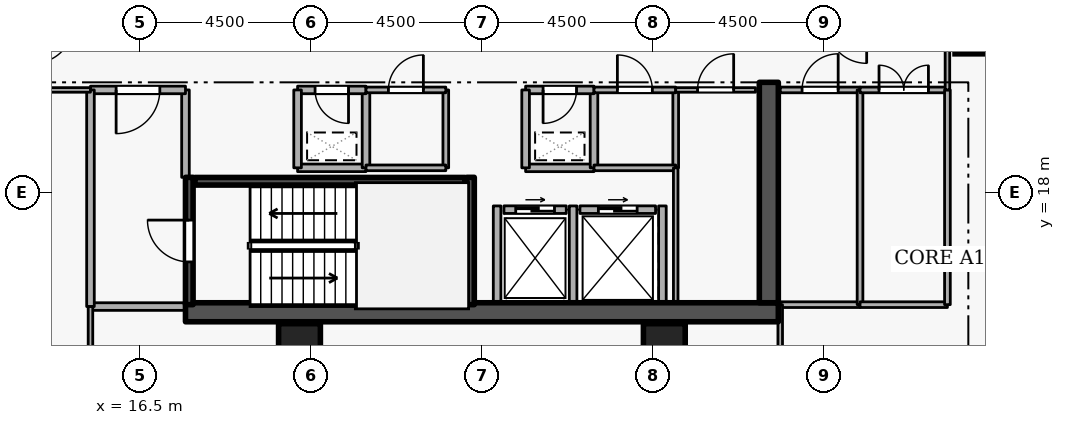
"""IFC4 building model, lengths in metres.
Left out: names, types, materials, properties, quantities, classifications, styles, units other than length and angle.
Written with IfcOpenShell. Run it as: python <this file> out.ifc"""

import sys

from ifc_helpers import new_model, si_unit, direction, frame, frame_2d, origin, origin_2d, place, context, subcontext, project, spatial, rectangle, extrude, element, fill, save


model = new_model("IFC4")
c1 = context("Model", 3, precision=1e-05, world=origin(), true_north=direction((0.0, 1.0)))
c2 = subcontext(c1, "Body", "Model", "MODEL_VIEW")
j1 = project(units=[si_unit("LENGTHUNIT", "METRE"), si_unit("PLANEANGLEUNIT", "RADIAN")], contexts=[c1])
p1 = place(None, origin())
s1 = spatial("IfcSite", under=j1, at=p1, CompositionType="ELEMENT")
p2 = place(p1, origin())
s2 = spatial("IfcBuilding", under=s1, at=p2, CompositionType="ELEMENT")
p3 = place(p2, frame((0.0, 0.0, 185.7)))
s3 = spatial("IfcBuildingStorey", under=s2, at=p3, CompositionType="ELEMENT", Elevation=185.7)
p4 = place(p3, frame((17.7, 14.85, 0.0), z_axis=(0.0, 0.0, 1.0), x_axis=(1.0, 0.0, 0.0)))
e1 = element("IfcWall", 1, at=p4, inside=s3, PredefinedType="SHEAR", context=c2, shape_type="SweptSolid", body=[
    extrude(rectangle(XDim=15.6, YDim=0.5, at=frame_2d((7.8, 0.0))), origin(), (0.0, 0.0, 1.0), 3.6),
])
p5 = place(p3, frame((33.05, 15.1, 0.0), z_axis=(0.0, 0.0, 1.0), x_axis=(0.0, 1.0, 0.0)))
e2 = element("IfcWall", 2, at=p5, inside=s3, PredefinedType="SHEAR", context=c2, shape_type="SweptSolid", body=[
    extrude(rectangle(XDim=5.8, YDim=0.5, at=frame_2d((2.9, 0.0))), origin(), (0.0, 0.0, 1.0), 3.6),
])
for number, where, z_axis, x_axis in (
    (3, (38.5, 22.2, 0.0), (0.0, 0.0, 1.0), (1.0, 0.0, 0.0)),
    (4, (20.7, 14.0, 0.0), (0.0, 0.0, 1.0), (1.0, 0.0, 0.0)),
    (5, (30.3, 14.0, 0.0), (0.0, 0.0, 1.0), (1.0, 0.0, 0.0)),
):
    element("IfcColumn", number, at=place(p3, frame(where, z_axis=z_axis, x_axis=x_axis)), inside=s3, PredefinedType="COLUMN", context=c2, shape_type="SweptSolid", body=[
        extrude(rectangle(XDim=1.1, YDim=1.1, at=origin_2d()), origin(), (0.0, 0.0, 1.0), 3.6),
    ])
p6 = place(p3, frame((26.08, 17.55, 0.0), z_axis=(0.0, 0.0, 1.0), x_axis=(1.0, 0.0, 0.0)))
e6 = element("IfcWall", 6, at=p6, inside=s3, PredefinedType="STANDARD", context=c2, shape_type="SweptSolid", body=[
    extrude(rectangle(XDim=1.64, YDim=0.2, at=frame_2d((0.82, 0.0))), origin(), (0.0, 0.0, 1.0), 3.34),
])
p7 = place(p6, frame((0.31, 0.0, 0.0)))
e7 = element("IfcOpeningElement", 7, at=p7, cuts=e6, PredefinedType="OPENING", context=c2, shape_type="SweptSolid", body=[
    extrude(rectangle(XDim=1.02, YDim=2.06, at=frame_2d((0.51, 1.03))), frame((0.0, 0.11, 0.0), z_axis=(0.0, -1.0, 0.0), x_axis=(1.0, 0.0, 0.0)), (0.0, 0.0, 1.0), 0.22),
])
p8 = place(p3, frame((28.08, 17.55, 0.0), z_axis=(0.0, 0.0, 1.0), x_axis=(1.0, 0.0, 0.0)))
e8 = element("IfcWall", 8, at=p8, inside=s3, PredefinedType="STANDARD", context=c2, shape_type="SweptSolid", body=[
    extrude(rectangle(XDim=1.99, YDim=0.2, at=frame_2d((0.995, 0.0))), origin(), (0.0, 0.0, 1.0), 3.34),
])
p9 = place(p8, frame((0.485, 0.0, 0.0)))
e9 = element("IfcOpeningElement", 9, at=p9, cuts=e8, PredefinedType="OPENING", context=c2, shape_type="SweptSolid", body=[
    extrude(rectangle(XDim=1.02, YDim=2.06, at=frame_2d((0.51, 1.03))), frame((0.0, 0.11, 0.0), z_axis=(0.0, -1.0, 0.0), x_axis=(1.0, 0.0, 0.0)), (0.0, 0.0, 1.0), 0.22),
])
for number, where, z_axis, x_axis in (
    (10, (27.9, 15.112, 0.0), (0.0, 0.0, 1.0), (0.0, 1.0, 0.0)),
    (11, (25.9, 15.112, 0.0), (0.0, 0.0, 1.0), (0.0, 1.0, 0.0)),
    (12, (30.25, 15.112, 0.0), (0.0, 0.0, 1.0), (0.0, 1.0, 0.0)),
):
    element("IfcWall", number, at=place(p3, frame(where, z_axis=z_axis, x_axis=x_axis)), inside=s3, PredefinedType="STANDARD", context=c2, shape_type="SweptSolid", body=[
        extrude(rectangle(XDim=2.536, YDim=0.2, at=frame_2d((1.268, 0.0))), origin(), (0.0, 0.0, 1.0), 3.34),
    ])
p10 = place(p3, frame((17.8, 15.05, 0.0), z_axis=(0.0, 0.0, 1.0), x_axis=(0.0, 1.0, 0.0)))
e13 = element("IfcWall", 13, at=p10, inside=s3, PredefinedType="SHEAR", context=c2, shape_type="SweptSolid", body=[
    extrude(rectangle(XDim=3.35, YDim=0.2, at=frame_2d((1.675, 0.0))), origin(), (0.0, 0.0, 1.0), 3.6),
])
p11 = place(p10, frame((1.125, 0.0, 0.0)))
e14 = element("IfcOpeningElement", 14, at=p11, cuts=e13, PredefinedType="OPENING", context=c2, shape_type="SweptSolid", body=[
    extrude(rectangle(XDim=1.1, YDim=2.1, at=frame_2d((0.55, 1.05))), frame((0.0, 0.11, 0.0), z_axis=(0.0, -1.0, 0.0), x_axis=(1.0, 0.0, 0.0)), (0.0, 0.0, 1.0), 0.22),
])
p12 = place(p3, frame((25.2, 18.4, 0.0), z_axis=(0.0, 0.0, 1.0), x_axis=(0.0, -1.0, 0.0)))
e15 = element("IfcWall", 15, at=p12, inside=s3, PredefinedType="SHEAR", context=c2, shape_type="SweptSolid", body=[
    extrude(rectangle(XDim=3.35, YDim=0.2, at=frame_2d((1.675, 0.0))), origin(), (0.0, 0.0, 1.0), 3.6),
])
p13 = place(p3, frame((25.05, 18.297, 0.0), z_axis=(0.0, 0.0, 1.0), x_axis=(-1.0, 0.0, 0.0)))
e16 = element("IfcWall", 16, at=p13, inside=s3, PredefinedType="SHEAR", context=c2, shape_type="SweptSolid", body=[
    extrude(rectangle(XDim=7.1, YDim=0.2, at=frame_2d((3.55, 0.0))), origin(), (0.0, 0.0, 1.0), 3.6),
])
p14 = place(p3, frame((15.2, 15.0, 0.0), z_axis=(0.0, 0.0, 1.0), x_axis=(1.0, 0.0, 0.0)))
e17 = element("IfcWall", 17, at=p14, inside=s3, PredefinedType="STANDARD", context=c2, shape_type="SweptSolid", body=[
    extrude(rectangle(XDim=2.5, YDim=0.2, at=frame_2d((1.25, 0.0))), origin(), (0.0, 0.0, 1.0), 3.34),
])
p15 = place(p3, frame((17.7, 18.4, 0.0), z_axis=(0.0, 0.0, 1.0), x_axis=(0.0, 1.0, 0.0)))
e18 = element("IfcWall", 18, at=p15, inside=s3, PredefinedType="STANDARD", context=c2, shape_type="SweptSolid", body=[
    extrude(rectangle(XDim=2.3, YDim=0.2, at=frame_2d((1.15, 0.0))), origin(), (0.0, 0.0, 1.0), 2.545),
])
p16 = place(p3, frame((17.7, 20.7, 0.0), z_axis=(0.0, 0.0, 1.0), x_axis=(-1.0, 0.0, 0.0)))
e19 = element("IfcWall", 19, at=p16, inside=s3, PredefinedType="STANDARD", context=c2, shape_type="SweptSolid", body=[
    extrude(rectangle(XDim=2.5, YDim=0.2, at=frame_2d((1.25, 0.0))), origin(), (0.0, 0.0, 1.0), 3.34),
])
p17 = place(p16, frame((0.675, 0.0, 0.0)))
e20 = element("IfcOpeningElement", 20, at=p17, cuts=e19, PredefinedType="OPENING", context=c2, shape_type="SweptSolid", body=[
    extrude(rectangle(XDim=1.15, YDim=2.1, at=frame_2d((0.575, 1.05))), frame((0.0, 0.11, 0.0), z_axis=(0.0, -1.0, 0.0), x_axis=(1.0, 0.0, 0.0)), (0.0, 0.0, 1.0), 0.22),
])
p18 = place(p3, frame((15.2, 20.7, 0.0), z_axis=(0.0, 0.0, 1.0), x_axis=(0.0, -1.0, 0.0)))
e21 = element("IfcWall", 21, at=p18, inside=s3, PredefinedType="STANDARD", context=c2, shape_type="SweptSolid", body=[
    extrude(rectangle(XDim=5.7, YDim=0.2, at=frame_2d((2.85, 0.0))), origin(), (0.0, 0.0, 1.0), 3.34),
])
p19 = place(p3, frame((26.65, 18.65, 0.0), z_axis=(0.0, 0.0, 1.0), x_axis=(1.0, 0.0, 0.0)))
e22 = element("IfcWall", 22, at=p19, inside=s3, PredefinedType="STANDARD", context=c2, shape_type="SweptSolid", body=[
    extrude(rectangle(XDim=1.8, YDim=0.2, at=frame_2d((0.9, 0.0))), origin(), (0.0, 0.0, 1.0), 3.34),
])
p20 = place(p3, frame((28.45, 18.65, 0.0), z_axis=(0.0, 0.0, 1.0), x_axis=(0.0, 1.0, 0.0)))
e23 = element("IfcWall", 23, at=p20, inside=s3, PredefinedType="STANDARD", context=c2, shape_type="SweptSolid", body=[
    extrude(rectangle(XDim=2.05, YDim=0.2, at=frame_2d((1.025, 0.0))), origin(), (0.0, 0.0, 1.0), 3.34),
])
p21 = place(p3, frame((28.45, 20.7, 0.0), z_axis=(0.0, 0.0, 1.0), x_axis=(-1.0, 0.0, 0.0)))
e24 = element("IfcWall", 24, at=p21, inside=s3, PredefinedType="STANDARD", context=c2, shape_type="SweptSolid", body=[
    extrude(rectangle(XDim=1.8, YDim=0.2, at=frame_2d((0.9, 0.0))), origin(), (0.0, 0.0, 1.0), 3.34),
])
p22 = place(p21, frame((0.46, 0.0, 0.0)))
e25 = element("IfcOpeningElement", 25, at=p22, cuts=e24, PredefinedType="OPENING", context=c2, shape_type="SweptSolid", body=[
    extrude(rectangle(XDim=0.88, YDim=2.04, at=frame_2d((0.44, 1.02))), frame((0.0, 0.11, 0.0), z_axis=(0.0, -1.0, 0.0), x_axis=(1.0, 0.0, 0.0)), (0.0, 0.0, 1.0), 0.22),
])
p23 = place(p3, frame((26.65, 20.7, 0.0), z_axis=(0.0, 0.0, 1.0), x_axis=(0.0, -1.0, 0.0)))
e26 = element("IfcWall", 26, at=p23, inside=s3, PredefinedType="STANDARD", context=c2, shape_type="SweptSolid", body=[
    extrude(rectangle(XDim=2.05, YDim=0.2, at=frame_2d((1.025, 0.0))), origin(), (0.0, 0.0, 1.0), 3.34),
])
p24 = place(p3, frame((20.65, 18.65, 0.0), z_axis=(0.0, 0.0, 1.0), x_axis=(1.0, 0.0, 0.0)))
e27 = element("IfcWall", 27, at=p24, inside=s3, PredefinedType="STANDARD", context=c2, shape_type="SweptSolid", body=[
    extrude(rectangle(XDim=1.8, YDim=0.2, at=frame_2d((0.9, 0.0))), origin(), (0.0, 0.0, 1.0), 3.34),
])
p25 = place(p3, frame((22.45, 18.65, 0.0), z_axis=(0.0, 0.0, 1.0), x_axis=(0.0, 1.0, 0.0)))
e28 = element("IfcWall", 28, at=p25, inside=s3, PredefinedType="STANDARD", context=c2, shape_type="SweptSolid", body=[
    extrude(rectangle(XDim=2.05, YDim=0.2, at=frame_2d((1.025, 0.0))), origin(), (0.0, 0.0, 1.0), 3.34),
])
p26 = place(p3, frame((22.45, 20.7, 0.0), z_axis=(0.0, 0.0, 1.0), x_axis=(-1.0, 0.0, 0.0)))
e29 = element("IfcWall", 29, at=p26, inside=s3, PredefinedType="STANDARD", context=c2, shape_type="SweptSolid", body=[
    extrude(rectangle(XDim=1.8, YDim=0.2, at=frame_2d((0.9, 0.0))), origin(), (0.0, 0.0, 1.0), 3.34),
])
p27 = place(p26, frame((0.46, 0.0, 0.0)))
e30 = element("IfcOpeningElement", 30, at=p27, cuts=e29, PredefinedType="OPENING", context=c2, shape_type="SweptSolid", body=[
    extrude(rectangle(XDim=0.88, YDim=2.04, at=frame_2d((0.44, 1.02))), frame((0.0, 0.11, 0.0), z_axis=(0.0, -1.0, 0.0), x_axis=(1.0, 0.0, 0.0)), (0.0, 0.0, 1.0), 0.22),
])
p28 = place(p3, frame((20.65, 20.7, 0.0), z_axis=(0.0, 0.0, 1.0), x_axis=(0.0, -1.0, 0.0)))
e31 = element("IfcWall", 31, at=p28, inside=s3, PredefinedType="STANDARD", context=c2, shape_type="SweptSolid", body=[
    extrude(rectangle(XDim=2.05, YDim=0.2, at=frame_2d((1.025, 0.0))), origin(), (0.0, 0.0, 1.0), 3.34),
])
p29 = place(p3, frame((24.55, 20.7, 0.0), z_axis=(0.0, 0.0, 1.0), x_axis=(0.0, -1.0, 0.0)))
e32 = element("IfcWall", 32, at=p29, inside=s3, PredefinedType="PARTITIONING", context=c2, shape_type="SweptSolid", body=[
    extrude(rectangle(XDim=2.05, YDim=0.15, at=frame_2d((1.025, 0.0))), origin(), (0.0, 0.0, 1.0), 3.34),
])
p30 = place(p3, frame((24.55, 18.65, 0.0), z_axis=(0.0, 0.0, 1.0), x_axis=(-1.0, 0.0, 0.0)))
e33 = element("IfcWall", 33, at=p30, inside=s3, PredefinedType="PARTITIONING", context=c2, shape_type="SweptSolid", body=[
    extrude(rectangle(XDim=2.1, YDim=0.15, at=frame_2d((1.05, 0.0))), origin(), (0.0, 0.0, 1.0), 3.34),
])
p31 = place(p3, frame((22.45, 20.7, 0.0), z_axis=(0.0, 0.0, 1.0), x_axis=(1.0, 0.0, 0.0)))
e34 = element("IfcWall", 34, at=p31, inside=s3, PredefinedType="PARTITIONING", context=c2, shape_type="SweptSolid", body=[
    extrude(rectangle(XDim=2.1, YDim=0.15, at=frame_2d((1.05, 0.0))), origin(), (0.0, 0.0, 1.0), 3.34),
])
p32 = place(p31, frame((0.59, 0.0, 0.0)))
e35 = element("IfcOpeningElement", 35, at=p32, cuts=e34, PredefinedType="OPENING", context=c2, shape_type="SweptSolid", body=[
    extrude(rectangle(XDim=0.92, YDim=2.08, at=frame_2d((0.46, 1.04))), frame((0.0, 0.085, 0.0), z_axis=(0.0, -1.0, 0.0), x_axis=(1.0, 0.0, 0.0)), (0.0, 0.0, 1.0), 0.17),
])
p33 = place(p3, frame((30.6, 20.7, 0.0), z_axis=(0.0, 0.0, 1.0), x_axis=(0.0, -1.0, 0.0)))
e36 = element("IfcWall", 36, at=p33, inside=s3, PredefinedType="PARTITIONING", context=c2, shape_type="SweptSolid", body=[
    extrude(rectangle(XDim=2.05, YDim=0.15, at=frame_2d((1.025, 0.0))), origin(), (0.0, 0.0, 1.0), 3.34),
])
p34 = place(p3, frame((30.6, 18.65, 0.0), z_axis=(0.0, 0.0, 1.0), x_axis=(-1.0, 0.0, 0.0)))
e37 = element("IfcWall", 37, at=p34, inside=s3, PredefinedType="PARTITIONING", context=c2, shape_type="SweptSolid", body=[
    extrude(rectangle(XDim=2.15, YDim=0.15, at=frame_2d((1.075, 0.0))), origin(), (0.0, 0.0, 1.0), 3.34),
])
p35 = place(p3, frame((28.45, 20.7, 0.0), z_axis=(0.0, 0.0, 1.0), x_axis=(1.0, 0.0, 0.0)))
e38 = element("IfcWall", 38, at=p35, inside=s3, PredefinedType="PARTITIONING", context=c2, shape_type="SweptSolid", body=[
    extrude(rectangle(XDim=2.15, YDim=0.15, at=frame_2d((1.075, 0.0))), origin(), (0.0, 0.0, 1.0), 3.34),
])
p36 = place(p35, frame((0.615, 0.0, 0.0)))
e39 = element("IfcOpeningElement", 39, at=p36, cuts=e38, PredefinedType="OPENING", context=c2, shape_type="SweptSolid", body=[
    extrude(rectangle(XDim=0.92, YDim=2.08, at=frame_2d((0.46, 1.04))), frame((0.0, 0.085, 0.0), z_axis=(0.0, -1.0, 0.0), x_axis=(1.0, 0.0, 0.0)), (0.0, 0.0, 1.0), 0.17),
])
p37 = place(p3, frame((30.6, 15.1, 0.0), z_axis=(0.0, 0.0, 1.0), x_axis=(0.0, 1.0, 0.0)))
e40 = element("IfcWall", 40, at=p37, inside=s3, PredefinedType="PARTITIONING", context=c2, shape_type="SweptSolid", body=[
    extrude(rectangle(XDim=3.55, YDim=0.12, at=frame_2d((1.775, 0.0))), origin(), (0.0, 0.0, 1.0), 3.34),
])
p38 = place(p3, frame((30.6, 20.7, 0.0), z_axis=(0.0, 0.0, 1.0), x_axis=(1.0, 0.0, 0.0)))
e41 = element("IfcWall", 41, at=p38, inside=s3, PredefinedType="PARTITIONING", context=c2, shape_type="SweptSolid", body=[
    extrude(rectangle(XDim=2.1, YDim=0.12, at=frame_2d((1.05, 0.0))), origin(), (0.0, 0.0, 1.0), 3.34),
])
p39 = place(p38, frame((0.575, 0.0, 0.0)))
e42 = element("IfcOpeningElement", 42, at=p39, cuts=e41, PredefinedType="OPENING", context=c2, shape_type="SweptSolid", body=[
    extrude(rectangle(XDim=0.95, YDim=2.1, at=frame_2d((0.475, 1.05))), frame((0.0, 0.07, 0.0), z_axis=(0.0, -1.0, 0.0), x_axis=(1.0, 0.0, 0.0)), (0.0, 0.0, 1.0), 0.14),
])
p40 = place(p3, frame((35.45, 15.05, 0.0), z_axis=(0.0, 0.0, 1.0), x_axis=(-1.0, 0.0, 0.0)))
e43 = element("IfcWall", 43, at=p40, inside=s3, PredefinedType="PARTITIONING", context=c2, shape_type="SweptSolid", body=[
    extrude(rectangle(XDim=2.1, YDim=0.15, at=frame_2d((1.05, 0.0))), origin(), (0.0, 0.0, 1.0), 3.34),
])
p41 = place(p3, frame((33.35, 20.7, 0.0), z_axis=(0.0, 0.0, 1.0), x_axis=(1.0, 0.0, 0.0)))
e44 = element("IfcWall", 44, at=p41, inside=s3, PredefinedType="PARTITIONING", context=c2, shape_type="SweptSolid", body=[
    extrude(rectangle(XDim=2.1, YDim=0.15, at=frame_2d((1.05, 0.0))), origin(), (0.0, 0.0, 1.0), 3.34),
])
p42 = place(p41, frame((0.575, 0.0, 0.0)))
e45 = element("IfcOpeningElement", 45, at=p42, cuts=e44, PredefinedType="OPENING", context=c2, shape_type="SweptSolid", body=[
    extrude(rectangle(XDim=0.95, YDim=2.1, at=frame_2d((0.475, 1.05))), frame((0.0, 0.085, 0.0), z_axis=(0.0, -1.0, 0.0), x_axis=(1.0, 0.0, 0.0)), (0.0, 0.0, 1.0), 0.17),
])
p43 = place(p3, frame((35.45, 20.7, 0.0), z_axis=(0.0, 0.0, 1.0), x_axis=(0.0, -1.0, 0.0)))
e46 = element("IfcWall", 46, at=p43, inside=s3, PredefinedType="PARTITIONING", context=c2, shape_type="SweptSolid", body=[
    extrude(rectangle(XDim=5.65, YDim=0.15, at=frame_2d((2.825, 0.0))), origin(), (0.0, 0.0, 1.0), 3.34),
])
p44 = place(p3, frame((37.75, 15.05, 0.0), z_axis=(0.0, 0.0, 1.0), x_axis=(-1.0, 0.0, 0.0)))
e47 = element("IfcWall", 47, at=p44, inside=s3, PredefinedType="PARTITIONING", context=c2, shape_type="SweptSolid", body=[
    extrude(rectangle(XDim=2.3, YDim=0.15, at=frame_2d((1.15, 0.0))), origin(), (0.0, 0.0, 1.0), 3.34),
])
p45 = place(p3, frame((35.45, 20.7, 0.0), z_axis=(0.0, 0.0, 1.0), x_axis=(1.0, 0.0, 0.0)))
e48 = element("IfcWall", 48, at=p45, inside=s3, PredefinedType="PARTITIONING", context=c2, shape_type="SweptSolid", body=[
    extrude(rectangle(XDim=2.3, YDim=0.15, at=frame_2d((1.15, 0.0))), origin(), (0.0, 0.0, 1.0), 3.34),
])
p46 = place(p45, frame((0.5, 0.0, 0.0)))
e49 = element("IfcOpeningElement", 49, at=p46, cuts=e48, PredefinedType="OPENING", context=c2, shape_type="SweptSolid", body=[
    extrude(rectangle(XDim=1.3, YDim=2.12, at=frame_2d((0.65, 1.06))), frame((0.0, 0.085, 0.0), z_axis=(0.0, -1.0, 0.0), x_axis=(1.0, 0.0, 0.0)), (0.0, 0.0, 1.0), 0.17),
])
p47 = place(p3, frame((37.75, 20.7, 0.0), z_axis=(0.0, 0.0, 1.0), x_axis=(0.0, -1.0, 0.0)))
e50 = element("IfcWall", 50, at=p47, inside=s3, PredefinedType="PARTITIONING", context=c2, shape_type="SweptSolid", body=[
    extrude(rectangle(XDim=5.65, YDim=0.15, at=frame_2d((2.825, 0.0))), origin(), (0.0, 0.0, 1.0), 3.34),
])
p48 = place(p3, frame((13.25, 20.7, 0.0), z_axis=(0.0, 0.0, 1.0), x_axis=(1.0, 0.0, 0.0)))
e51 = element("IfcWall", 51, at=p48, inside=s3, PredefinedType="PARTITIONING", context=c2, shape_type="SweptSolid", body=[
    extrude(rectangle(XDim=1.95, YDim=0.12, at=frame_2d((0.975, 0.0))), origin(), (0.0, 0.0, 1.0), 3.34),
])
p49 = place(p3, frame((15.2, 15.0, 0.0), z_axis=(0.0, 0.0, 1.0), x_axis=(0.0, -1.0, 0.0)))
e52 = element("IfcWall", 52, at=p49, inside=s3, PredefinedType="PARTITIONING", context=c2, shape_type="SweptSolid", body=[
    extrude(rectangle(XDim=5.72, YDim=0.12, at=frame_2d((2.86, 0.0))), origin(), (0.0, 0.0, 1.0), 3.34),
])
p50 = place(p3, frame((37.75, 20.7, 0.0), z_axis=(0.0, 0.0, 1.0), x_axis=(0.0, 1.0, 0.0)))
e53 = element("IfcWall", 53, at=p50, inside=s3, PredefinedType="PARTITIONING", context=c2, shape_type="SweptSolid", body=[
    extrude(rectangle(XDim=1.75, YDim=0.12, at=frame_2d((0.875, 0.0))), origin(), (0.0, 0.0, 1.0), 3.34),
])
p51 = place(p3, frame((33.35, 9.28, 0.0), z_axis=(0.0, 0.0, 1.0), x_axis=(0.0, 1.0, 0.0)))
e54 = element("IfcWall", 54, at=p51, inside=s3, PredefinedType="PARTITIONING", context=c2, shape_type="SweptSolid", body=[
    extrude(rectangle(XDim=5.77, YDim=0.12, at=frame_2d((2.885, 0.0))), origin(), (0.0, 0.0, 1.0), 2.545),
])
p52 = place(p7, origin())
e55 = element("IfcDoor", 55, at=p52, inside=s3, OperationType="SLIDING_TO_LEFT", PredefinedType="DOOR", context=c2, shape_type="SweptSolid", body=[
    extrude(rectangle(XDim=1.02, YDim=2.06, at=frame_2d((0.51, 1.03))), frame((0.0, 0.025, 0.0), z_axis=(0.0, -1.0, 0.0), x_axis=(1.0, 0.0, 0.0)), (0.0, 0.0, 1.0), 0.05),
])
fill(e7, e55)
p53 = place(p9, origin())
e56 = element("IfcDoor", 56, at=p53, inside=s3, OperationType="SLIDING_TO_LEFT", PredefinedType="DOOR", context=c2, shape_type="SweptSolid", body=[
    extrude(rectangle(XDim=1.02, YDim=2.06, at=frame_2d((0.51, 1.03))), frame((0.0, 0.025, 0.0), z_axis=(0.0, -1.0, 0.0), x_axis=(1.0, 0.0, 0.0)), (0.0, 0.0, 1.0), 0.05),
])
fill(e9, e56)
p54 = place(p11, origin())
e57 = element("IfcDoor", 57, at=p54, inside=s3, OperationType="SINGLE_SWING_RIGHT", PredefinedType="DOOR", context=c2, shape_type="SweptSolid", body=[
    extrude(rectangle(XDim=1.1, YDim=2.1, at=frame_2d((0.55, 1.05))), frame((0.0, 0.025, 0.0), z_axis=(0.0, -1.0, 0.0), x_axis=(1.0, 0.0, 0.0)), (0.0, 0.0, 1.0), 0.05),
])
fill(e14, e57)
p55 = place(p17, origin())
e58 = element("IfcDoor", 58, at=p55, inside=s3, OperationType="SINGLE_SWING_RIGHT", PredefinedType="DOOR", context=c2, shape_type="SweptSolid", body=[
    extrude(rectangle(XDim=1.15, YDim=2.1, at=frame_2d((0.575, 1.05))), frame((0.0, 0.025, 0.0), z_axis=(0.0, -1.0, 0.0), x_axis=(1.0, 0.0, 0.0)), (0.0, 0.0, 1.0), 0.05),
])
fill(e20, e58)
p56 = place(p22, origin())
e59 = element("IfcDoor", 59, at=p56, inside=s3, OperationType="SINGLE_SWING_RIGHT", PredefinedType="DOOR", context=c2, shape_type="SweptSolid", body=[
    extrude(rectangle(XDim=0.88, YDim=2.04, at=frame_2d((0.44, 1.02))), frame((0.0, 0.025, 0.0), z_axis=(0.0, -1.0, 0.0), x_axis=(1.0, 0.0, 0.0)), (0.0, 0.0, 1.0), 0.05),
])
fill(e25, e59)
p57 = place(p27, origin())
e60 = element("IfcDoor", 60, at=p57, inside=s3, OperationType="SINGLE_SWING_LEFT", PredefinedType="DOOR", context=c2, shape_type="SweptSolid", body=[
    extrude(rectangle(XDim=0.88, YDim=2.04, at=frame_2d((0.44, 1.02))), frame((0.0, 0.025, 0.0), z_axis=(0.0, -1.0, 0.0), x_axis=(1.0, 0.0, 0.0)), (0.0, 0.0, 1.0), 0.05),
])
fill(e30, e60)
p58 = place(p32, origin())
e61 = element("IfcDoor", 61, at=p58, inside=s3, OperationType="SINGLE_SWING_RIGHT", PredefinedType="DOOR", context=c2, shape_type="SweptSolid", body=[
    extrude(rectangle(XDim=0.92, YDim=2.08, at=frame_2d((0.46, 1.04))), frame((0.0, 0.025, 0.0), z_axis=(0.0, -1.0, 0.0), x_axis=(1.0, 0.0, 0.0)), (0.0, 0.0, 1.0), 0.05),
])
fill(e35, e61)
p59 = place(p36, origin())
e62 = element("IfcDoor", 62, at=p59, inside=s3, OperationType="SINGLE_SWING_LEFT", PredefinedType="DOOR", context=c2, shape_type="SweptSolid", body=[
    extrude(rectangle(XDim=0.92, YDim=2.08, at=frame_2d((0.46, 1.04))), frame((0.0, 0.025, 0.0), z_axis=(0.0, -1.0, 0.0), x_axis=(1.0, 0.0, 0.0)), (0.0, 0.0, 1.0), 0.05),
])
fill(e39, e62)
p60 = place(p39, origin())
e63 = element("IfcDoor", 63, at=p60, inside=s3, OperationType="SINGLE_SWING_RIGHT", PredefinedType="DOOR", context=c2, shape_type="SweptSolid", body=[
    extrude(rectangle(XDim=0.95, YDim=2.1, at=frame_2d((0.475, 1.05))), frame((0.0, 0.025, 0.0), z_axis=(0.0, -1.0, 0.0), x_axis=(1.0, 0.0, 0.0)), (0.0, 0.0, 1.0), 0.05),
])
fill(e42, e63)
p61 = place(p42, origin())
e64 = element("IfcDoor", 64, at=p61, inside=s3, OperationType="SINGLE_SWING_RIGHT", PredefinedType="DOOR", context=c2, shape_type="SweptSolid", body=[
    extrude(rectangle(XDim=0.95, YDim=2.1, at=frame_2d((0.475, 1.05))), frame((0.0, 0.025, 0.0), z_axis=(0.0, -1.0, 0.0), x_axis=(1.0, 0.0, 0.0)), (0.0, 0.0, 1.0), 0.05),
])
fill(e45, e64)
p62 = place(p46, origin())
e65 = element("IfcDoor", 65, at=p62, inside=s3, OperationType="DOUBLE_DOOR_SINGLE_SWING", PredefinedType="DOOR", context=c2, shape_type="SweptSolid", body=[
    extrude(rectangle(XDim=1.3, YDim=2.12, at=frame_2d((0.65, 1.06))), frame((0.0, 0.025, 0.0), z_axis=(0.0, -1.0, 0.0), x_axis=(1.0, 0.0, 0.0)), (0.0, 0.0, 1.0), 0.05),
])
fill(e49, e65)
save(model, sys.argv[1])
